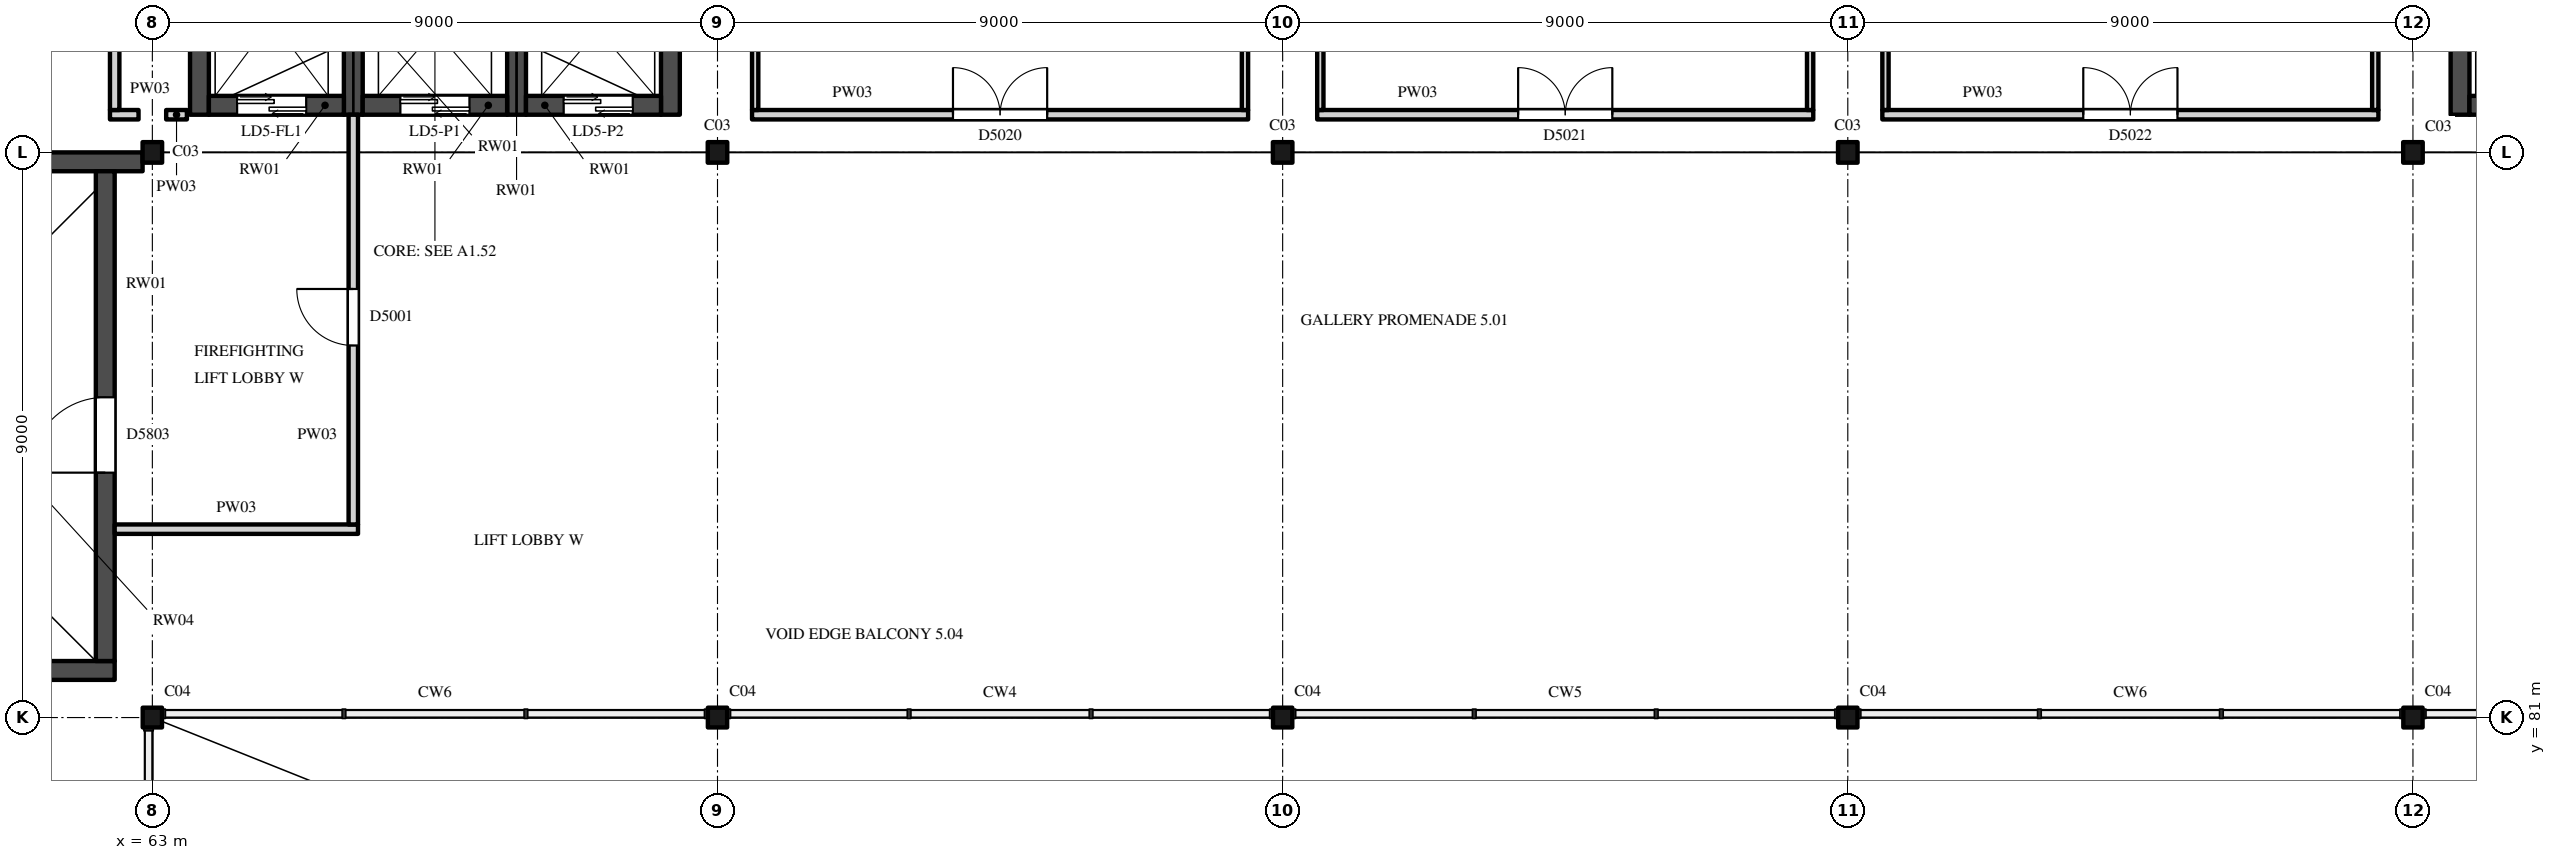
"""IFC4 building model, lengths in metres.
Left out: names, types, materials, properties, quantities, classifications, styles, units other than length and angle.
Written with IfcOpenShell. Run it as: python <this file> out.ifc"""

import sys

from ifc_helpers import new_model, si_unit, direction, frame, frame_2d, origin, origin_2d, place, context, subcontext, project, spatial, rectangle, i_section, extrude, element, fill, save


model = new_model("IFC4")
c1 = context("Model", 3, precision=1e-05, world=origin(), true_north=direction((0.0, 1.0)))
c2 = subcontext(c1, "Body", "Model", "MODEL_VIEW")
j1 = project(units=[si_unit("LENGTHUNIT", "METRE"), si_unit("PLANEANGLEUNIT", "RADIAN")], contexts=[c1])
p1 = place(None, origin())
s1 = spatial("IfcSite", under=j1, at=p1, CompositionType="ELEMENT")
p2 = place(p1, origin())
s2 = spatial("IfcBuilding", under=s1, at=p2, CompositionType="ELEMENT")
p3 = place(p2, frame((0.0, 0.0, 31.0)))
s3 = spatial("IfcBuildingStorey", under=s2, at=p3, CompositionType="ELEMENT", Elevation=31.0)
for number, where, z_axis, x_axis in (
    (1, (63.0, 81.0, 0.0), (0.0, 0.0, 1.0), (1.0, 0.0, 0.0)),
    (2, (72.0, 81.0, 0.0), (0.0, 0.0, 1.0), (1.0, 0.0, 0.0)),
    (3, (81.0, 81.0, 0.0), (0.0, 0.0, 1.0), (1.0, 0.0, 0.0)),
    (4, (90.0, 81.0, 0.0), (0.0, 0.0, 1.0), (1.0, 0.0, 0.0)),
    (5, (99.0, 81.0, 0.0), (0.0, 0.0, 1.0), (1.0, 0.0, 0.0)),
):
    element("IfcColumn", number, at=place(p3, frame(where, z_axis=z_axis, x_axis=x_axis)), inside=s3, PredefinedType="COLUMN", context=c2, shape_type="SweptSolid", body=[
        extrude(i_section(OverallWidth=0.307, OverallDepth=0.315, WebThickness=0.012, FlangeThickness=0.019, FilletRadius=0.017, at=origin_2d()), origin(), (0.0, 0.0, 1.0), 5.0),
    ])
for number, where, z_axis, x_axis in (
    (6, (63.0, 90.0, 0.0), (0.0, 0.0, 1.0), (1.0, 0.0, 0.0)),
    (7, (72.0, 90.0, 0.0), (0.0, 0.0, 1.0), (1.0, 0.0, 0.0)),
    (8, (81.0, 90.0, 0.0), (0.0, 0.0, 1.0), (1.0, 0.0, 0.0)),
    (9, (90.0, 90.0, 0.0), (0.0, 0.0, 1.0), (1.0, 0.0, 0.0)),
    (10, (99.0, 90.0, 0.0), (0.0, 0.0, 1.0), (1.0, 0.0, 0.0)),
):
    element("IfcColumn", number, at=place(p3, frame(where, z_axis=z_axis, x_axis=x_axis)), inside=s3, PredefinedType="COLUMN", context=c2, shape_type="SweptSolid", body=[
        extrude(i_section(OverallWidth=0.311, OverallDepth=0.327, WebThickness=0.016, FlangeThickness=0.025, FilletRadius=0.017, at=origin_2d()), origin(), (0.0, 0.0, 1.0), 5.0),
    ])
p4 = place(p3, frame((54.3, 81.75, 0.0), z_axis=(0.0, 0.0, 1.0), x_axis=(1.0, 0.0, 0.0)))
e11 = element("IfcWall", 11, at=p4, inside=s3, PredefinedType="SHEAR", context=c2, shape_type="SweptSolid", body=[
    extrude(rectangle(XDim=8.1, YDim=0.3, at=frame_2d((4.05, 0.0))), origin(), (0.0, 0.0, 1.0), 5.0),
])
p5 = place(p3, frame((54.3, 89.85, 0.0), z_axis=(0.0, 0.0, 1.0), x_axis=(1.0, 0.0, 0.0)))
e12 = element("IfcWall", 12, at=p5, inside=s3, PredefinedType="SHEAR", context=c2, shape_type="SweptSolid", body=[
    extrude(rectangle(XDim=8.544, YDim=0.3, at=frame_2d((4.272, 0.0))), origin(), (0.0, 0.0, 1.0), 5.0),
])
p6 = place(p3, frame((62.25, 81.9, 0.0), z_axis=(0.0, 0.0, 1.0), x_axis=(0.0, 1.0, 0.0)))
e13 = element("IfcWall", 13, at=p6, inside=s3, PredefinedType="SHEAR", context=c2, shape_type="SweptSolid", body=[
    extrude(rectangle(XDim=7.8, YDim=0.3, at=frame_2d((3.9, 0.0))), origin(), (0.0, 0.0, 1.0), 5.0),
])
p7 = place(p6, frame((3.0, 0.0, 0.0)))
e14 = element("IfcOpeningElement", 14, at=p7, cuts=e13, PredefinedType="OPENING", context=c2, shape_type="SweptSolid", body=[
    extrude(rectangle(XDim=1.2, YDim=2.1, at=frame_2d((0.6, 1.05))), frame((0.0, 0.16, 0.0), z_axis=(0.0, -1.0, 0.0), x_axis=(1.0, 0.0, 0.0)), (0.0, 0.0, 1.0), 0.32),
])
for number, where, z_axis, x_axis in (
    (15, (63.75, 90.6, 0.0), (0.0, 0.0, 1.0), (0.0, 1.0, 0.0)),
    (16, (66.2, 90.6, 0.0), (0.0, 0.0, 1.0), (0.0, 1.0, 0.0)),
    (17, (68.8, 90.6, 0.0), (0.0, 0.0, 1.0), (0.0, 1.0, 0.0)),
    (18, (71.25, 90.6, 0.0), (0.0, 0.0, 1.0), (0.0, 1.0, 0.0)),
):
    element("IfcWall", number, at=place(p3, frame(where, z_axis=z_axis, x_axis=x_axis)), inside=s3, PredefinedType="SHEAR", context=c2, shape_type="SweptSolid", body=[
        extrude(rectangle(XDim=3.6, YDim=0.3, at=frame_2d((1.8, 0.0))), origin(), (0.0, 0.0, 1.0), 5.0),
    ])
p8 = place(p3, frame((63.9, 90.75, 0.0), z_axis=(0.0, 0.0, 1.0), x_axis=(1.0, 0.0, 0.0)))
e19 = element("IfcWall", 19, at=p8, inside=s3, PredefinedType="SHEAR", context=c2, shape_type="SweptSolid", body=[
    extrude(rectangle(XDim=2.15, YDim=0.3, at=frame_2d((1.075, 0.0))), origin(), (0.0, 0.0, 1.0), 5.0),
])
p9 = place(p8, frame((0.45, 0.0, 0.0)))
e20 = element("IfcOpeningElement", 20, at=p9, cuts=e19, PredefinedType="OPENING", context=c2, shape_type="SweptSolid", body=[
    extrude(rectangle(XDim=1.1, YDim=2.1, at=frame_2d((0.55, 1.05))), frame((0.0, 0.16, 0.0), z_axis=(0.0, -1.0, 0.0), x_axis=(1.0, 0.0, 0.0)), (0.0, 0.0, 1.0), 0.32),
])
p10 = place(p3, frame((66.35, 90.75, 0.0), z_axis=(0.0, 0.0, 1.0), x_axis=(1.0, 0.0, 0.0)))
e21 = element("IfcWall", 21, at=p10, inside=s3, PredefinedType="SHEAR", context=c2, shape_type="SweptSolid", body=[
    extrude(rectangle(XDim=2.3, YDim=0.3, at=frame_2d((1.15, 0.0))), origin(), (0.0, 0.0, 1.0), 5.0),
])
p11 = place(p10, frame((0.6, 0.0, 0.0)))
e22 = element("IfcOpeningElement", 22, at=p11, cuts=e21, PredefinedType="OPENING", context=c2, shape_type="SweptSolid", body=[
    extrude(rectangle(XDim=1.1, YDim=2.1, at=frame_2d((0.55, 1.05))), frame((0.0, 0.16, 0.0), z_axis=(0.0, -1.0, 0.0), x_axis=(1.0, 0.0, 0.0)), (0.0, 0.0, 1.0), 0.32),
])
p12 = place(p3, frame((68.95, 90.75, 0.0), z_axis=(0.0, 0.0, 1.0), x_axis=(1.0, 0.0, 0.0)))
e23 = element("IfcWall", 23, at=p12, inside=s3, PredefinedType="SHEAR", context=c2, shape_type="SweptSolid", body=[
    extrude(rectangle(XDim=2.15, YDim=0.3, at=frame_2d((1.075, 0.0))), origin(), (0.0, 0.0, 1.0), 5.0),
])
p13 = place(p12, frame((0.6, 0.0, 0.0)))
e24 = element("IfcOpeningElement", 24, at=p13, cuts=e23, PredefinedType="OPENING", context=c2, shape_type="SweptSolid", body=[
    extrude(rectangle(XDim=1.1, YDim=2.1, at=frame_2d((0.55, 1.05))), frame((0.0, 0.16, 0.0), z_axis=(0.0, -1.0, 0.0), x_axis=(1.0, 0.0, 0.0)), (0.0, 0.0, 1.0), 0.32),
])
p14 = place(p3, frame((99.75, 90.6, 0.0), z_axis=(0.0, 0.0, 1.0), x_axis=(0.0, 1.0, 0.0)))
e25 = element("IfcWall", 25, at=p14, inside=s3, PredefinedType="SHEAR", context=c2, shape_type="SweptSolid", body=[
    extrude(rectangle(XDim=3.6, YDim=0.3, at=frame_2d((1.8, 0.0))), origin(), (0.0, 0.0, 1.0), 5.0),
])
p15 = place(p3, frame((99.9, 90.75, 0.0), z_axis=(0.0, 0.0, 1.0), x_axis=(1.0, 0.0, 0.0)))
e26 = element("IfcWall", 26, at=p15, inside=s3, PredefinedType="SHEAR", context=c2, shape_type="SweptSolid", body=[
    extrude(rectangle(XDim=2.15, YDim=0.3, at=frame_2d((1.075, 0.0))), origin(), (0.0, 0.0, 1.0), 5.0),
])
p16 = place(p15, frame((0.45, 0.0, 0.0)))
e27 = element("IfcOpeningElement", 27, at=p16, cuts=e26, PredefinedType="OPENING", context=c2, shape_type="SweptSolid", body=[
    extrude(rectangle(XDim=1.1, YDim=2.1, at=frame_2d((0.55, 1.05))), frame((0.0, 0.16, 0.0), z_axis=(0.0, -1.0, 0.0), x_axis=(1.0, 0.0, 0.0)), (0.0, 0.0, 1.0), 0.32),
])
p17 = place(p3, frame((62.4, 84.0, 0.0), z_axis=(0.0, 0.0, 1.0), x_axis=(1.0, 0.0, 0.0)))
e28 = element("IfcWall", 28, at=p17, inside=s3, PredefinedType="PARTITIONING", context=c2, shape_type="SweptSolid", body=[
    extrude(rectangle(XDim=3.875, YDim=0.15, at=frame_2d((1.938, 0.0))), origin(), (0.0, 0.0, 1.0), 4.521),
])
p18 = place(p3, frame((62.325, 90.6, 0.0), z_axis=(0.0, 0.0, 1.0), x_axis=(1.0, 0.0, 0.0)))
e29 = element("IfcWall", 29, at=p18, inside=s3, PredefinedType="PARTITIONING", context=c2, shape_type="SweptSolid", body=[
    extrude(rectangle(XDim=0.455, YDim=0.15, at=frame_2d((0.228, 0.0))), origin(), (0.0, 0.0, 1.0), 4.825),
])
p19 = place(p3, frame((63.22, 90.6, 0.0), z_axis=(0.0, 0.0, 1.0), x_axis=(1.0, 0.0, 0.0)))
e30 = element("IfcWall", 30, at=p19, inside=s3, PredefinedType="PARTITIONING", context=c2, shape_type="SweptSolid", body=[
    extrude(rectangle(XDim=0.33, YDim=0.15, at=frame_2d((0.165, 0.0))), origin(), (0.0, 0.0, 1.0), 4.825),
])
p20 = place(p3, frame((72.55, 90.6, 0.0), z_axis=(0.0, 0.0, 1.0), x_axis=(1.0, 0.0, 0.0)))
e31 = element("IfcWall", 31, at=p20, inside=s3, PredefinedType="PARTITIONING", context=c2, shape_type="SweptSolid", body=[
    extrude(rectangle(XDim=7.9, YDim=0.15, at=frame_2d((3.95, 0.0))), origin(), (0.0, 0.0, 1.0), 4.825),
])
p21 = place(p20, frame((3.2, 0.0, 0.0)))
e32 = element("IfcOpeningElement", 32, at=p21, cuts=e31, PredefinedType="OPENING", context=c2, shape_type="SweptSolid", body=[
    extrude(rectangle(XDim=1.5, YDim=2.4, at=frame_2d((0.75, 1.2))), frame((0.0, 0.085, 0.0), z_axis=(0.0, -1.0, 0.0), x_axis=(1.0, 0.0, 0.0)), (0.0, 0.0, 1.0), 0.17),
])
p22 = place(p3, frame((81.55, 90.6, 0.0), z_axis=(0.0, 0.0, 1.0), x_axis=(1.0, 0.0, 0.0)))
e33 = element("IfcWall", 33, at=p22, inside=s3, PredefinedType="PARTITIONING", context=c2, shape_type="SweptSolid", body=[
    extrude(rectangle(XDim=7.9, YDim=0.15, at=frame_2d((3.95, 0.0))), origin(), (0.0, 0.0, 1.0), 4.825),
])
p23 = place(p22, frame((3.2, 0.0, 0.0)))
e34 = element("IfcOpeningElement", 34, at=p23, cuts=e33, PredefinedType="OPENING", context=c2, shape_type="SweptSolid", body=[
    extrude(rectangle(XDim=1.5, YDim=2.4, at=frame_2d((0.75, 1.2))), frame((0.0, 0.085, 0.0), z_axis=(0.0, -1.0, 0.0), x_axis=(1.0, 0.0, 0.0)), (0.0, 0.0, 1.0), 0.17),
])
p24 = place(p3, frame((90.55, 90.6, 0.0), z_axis=(0.0, 0.0, 1.0), x_axis=(1.0, 0.0, 0.0)))
e35 = element("IfcWall", 35, at=p24, inside=s3, PredefinedType="PARTITIONING", context=c2, shape_type="SweptSolid", body=[
    extrude(rectangle(XDim=7.9, YDim=0.15, at=frame_2d((3.95, 0.0))), origin(), (0.0, 0.0, 1.0), 4.825),
])
p25 = place(p24, frame((3.2, 0.0, 0.0)))
e36 = element("IfcOpeningElement", 36, at=p25, cuts=e35, PredefinedType="OPENING", context=c2, shape_type="SweptSolid", body=[
    extrude(rectangle(XDim=1.5, YDim=2.4, at=frame_2d((0.75, 1.2))), frame((0.0, 0.085, 0.0), z_axis=(0.0, -1.0, 0.0), x_axis=(1.0, 0.0, 0.0)), (0.0, 0.0, 1.0), 0.17),
])
p26 = place(p3, frame((62.4, 90.675, 0.0), z_axis=(0.0, 0.0, 1.0), x_axis=(0.0, 1.0, 0.0)))
e37 = element("IfcWall", 37, at=p26, inside=s3, PredefinedType="PARTITIONING", context=c2, shape_type="SweptSolid", body=[
    extrude(rectangle(XDim=3.45, YDim=0.15, at=frame_2d((1.725, 0.0))), origin(), (0.0, 0.0, 1.0), 4.825),
])
p27 = place(p3, frame((66.2, 84.075, 0.0), z_axis=(0.0, 0.0, 1.0), x_axis=(0.0, 1.0, 0.0)))
e38 = element("IfcWall", 38, at=p27, inside=s3, PredefinedType="PARTITIONING", context=c2, shape_type="SweptSolid", body=[
    extrude(rectangle(XDim=6.525, YDim=0.15, at=frame_2d((3.263, 0.0))), origin(), (0.0, 0.0, 1.0), 4.825),
])
p28 = place(p27, frame((2.85, 0.0, 0.0)))
e39 = element("IfcOpeningElement", 39, at=p28, cuts=e38, PredefinedType="OPENING", context=c2, shape_type="SweptSolid", body=[
    extrude(rectangle(XDim=0.9, YDim=2.1, at=frame_2d((0.45, 1.05))), frame((0.0, 0.085, 0.0), z_axis=(0.0, -1.0, 0.0), x_axis=(1.0, 0.0, 0.0)), (0.0, 0.0, 1.0), 0.17),
])
for number, where, z_axis, x_axis in (
    (40, (72.6, 90.675, 0.0), (0.0, 0.0, 1.0), (0.0, 1.0, 0.0)),
    (41, (80.4, 90.675, 0.0), (0.0, 0.0, 1.0), (0.0, 1.0, 0.0)),
    (42, (81.6, 90.675, 0.0), (0.0, 0.0, 1.0), (0.0, 1.0, 0.0)),
    (43, (89.4, 90.675, 0.0), (0.0, 0.0, 1.0), (0.0, 1.0, 0.0)),
    (44, (90.6, 90.675, 0.0), (0.0, 0.0, 1.0), (0.0, 1.0, 0.0)),
    (45, (98.4, 90.675, 0.0), (0.0, 0.0, 1.0), (0.0, 1.0, 0.0)),
):
    element("IfcWall", number, at=place(p3, frame(where, z_axis=z_axis, x_axis=x_axis)), inside=s3, PredefinedType="PARTITIONING", context=c2, shape_type="SweptSolid", body=[
        extrude(rectangle(XDim=12.75, YDim=0.1, at=frame_2d((6.375, 0.0))), origin(), (0.0, 0.0, 1.0), 4.825),
    ])
p29 = place(p7, origin())
e46 = element("IfcDoor", 46, at=p29, inside=s3, OperationType="SINGLE_SWING_RIGHT", PredefinedType="DOOR", context=c2, shape_type="SweptSolid", body=[
    extrude(rectangle(XDim=1.2, YDim=2.1, at=frame_2d((0.6, 1.05))), frame((0.0, 0.025, 0.0), z_axis=(0.0, -1.0, 0.0), x_axis=(1.0, 0.0, 0.0)), (0.0, 0.0, 1.0), 0.05),
])
fill(e14, e46)
p30 = place(p9, origin())
e47 = element("IfcDoor", 47, at=p30, inside=s3, OperationType="DOUBLE_DOOR_SLIDING", PredefinedType="DOOR", context=c2, shape_type="SweptSolid", body=[
    extrude(rectangle(XDim=1.1, YDim=2.1, at=frame_2d((0.55, 1.05))), frame((0.0, 0.025, 0.0), z_axis=(0.0, -1.0, 0.0), x_axis=(1.0, 0.0, 0.0)), (0.0, 0.0, 1.0), 0.05),
])
fill(e20, e47)
p31 = place(p11, origin())
e48 = element("IfcDoor", 48, at=p31, inside=s3, OperationType="DOUBLE_DOOR_SLIDING", PredefinedType="DOOR", context=c2, shape_type="SweptSolid", body=[
    extrude(rectangle(XDim=1.1, YDim=2.1, at=frame_2d((0.55, 1.05))), frame((0.0, 0.025, 0.0), z_axis=(0.0, -1.0, 0.0), x_axis=(1.0, 0.0, 0.0)), (0.0, 0.0, 1.0), 0.05),
])
fill(e22, e48)
p32 = place(p13, origin())
e49 = element("IfcDoor", 49, at=p32, inside=s3, OperationType="DOUBLE_DOOR_SLIDING", PredefinedType="DOOR", context=c2, shape_type="SweptSolid", body=[
    extrude(rectangle(XDim=1.1, YDim=2.1, at=frame_2d((0.55, 1.05))), frame((0.0, 0.025, 0.0), z_axis=(0.0, -1.0, 0.0), x_axis=(1.0, 0.0, 0.0)), (0.0, 0.0, 1.0), 0.05),
])
fill(e24, e49)
p33 = place(p28, origin())
e50 = element("IfcDoor", 50, at=p33, inside=s3, OperationType="SINGLE_SWING_LEFT", PredefinedType="DOOR", context=c2, shape_type="SweptSolid", body=[
    extrude(rectangle(XDim=0.9, YDim=2.1, at=frame_2d((0.45, 1.05))), frame((0.0, 0.025, 0.0), z_axis=(0.0, -1.0, 0.0), x_axis=(1.0, 0.0, 0.0)), (0.0, 0.0, 1.0), 0.05),
])
fill(e39, e50)
p34 = place(p21, origin())
e51 = element("IfcDoor", 51, at=p34, inside=s3, OperationType="DOUBLE_DOOR_SINGLE_SWING", PredefinedType="DOOR", context=c2, shape_type="SweptSolid", body=[
    extrude(rectangle(XDim=1.5, YDim=2.4, at=frame_2d((0.75, 1.2))), frame((0.0, 0.025, 0.0), z_axis=(0.0, -1.0, 0.0), x_axis=(1.0, 0.0, 0.0)), (0.0, 0.0, 1.0), 0.05),
])
fill(e32, e51)
p35 = place(p23, origin())
e52 = element("IfcDoor", 52, at=p35, inside=s3, OperationType="DOUBLE_DOOR_SINGLE_SWING", PredefinedType="DOOR", context=c2, shape_type="SweptSolid", body=[
    extrude(rectangle(XDim=1.5, YDim=2.4, at=frame_2d((0.75, 1.2))), frame((0.0, 0.025, 0.0), z_axis=(0.0, -1.0, 0.0), x_axis=(1.0, 0.0, 0.0)), (0.0, 0.0, 1.0), 0.05),
])
fill(e34, e52)
p36 = place(p25, origin())
e53 = element("IfcDoor", 53, at=p36, inside=s3, OperationType="DOUBLE_DOOR_SINGLE_SWING", PredefinedType="DOOR", context=c2, shape_type="SweptSolid", body=[
    extrude(rectangle(XDim=1.5, YDim=2.4, at=frame_2d((0.75, 1.2))), frame((0.0, 0.025, 0.0), z_axis=(0.0, -1.0, 0.0), x_axis=(1.0, 0.0, 0.0)), (0.0, 0.0, 1.0), 0.05),
])
fill(e36, e53)
save(model, sys.argv[1])
